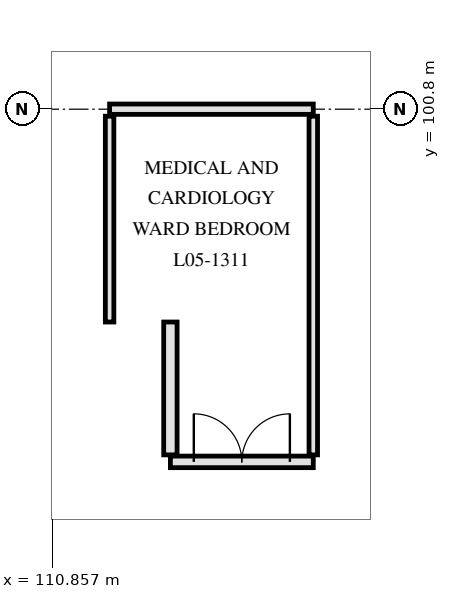
"""IFC4 building model, lengths in metres.
Left out: names, types, materials, properties, quantities, classifications, styles, units other than length and angle.
Written with IfcOpenShell. Run it as: python <this file> out.ifc"""

import sys

from ifc_helpers import new_model, si_unit, direction, frame, frame_2d, origin, place, context, subcontext, project, spatial, rectangle, extrude, element, fill, save


model = new_model("IFC4")
c1 = context("Model", 3, precision=1e-05, world=origin(), true_north=direction((0.0, 1.0)))
c2 = subcontext(c1, "Body", "Model", "MODEL_VIEW")
j1 = project(units=[si_unit("LENGTHUNIT", "METRE"), si_unit("PLANEANGLEUNIT", "RADIAN")], contexts=[c1])
p1 = place(None, origin())
s1 = spatial("IfcSite", under=j1, at=p1, CompositionType="ELEMENT")
p2 = place(p1, origin())
s2 = spatial("IfcBuilding", under=s1, at=p2, CompositionType="ELEMENT")
p3 = place(p2, frame((0.0, 0.0, 22.5)))
s3 = spatial("IfcBuildingStorey", under=s2, at=p3, CompositionType="ELEMENT", Elevation=22.5)
p4 = place(p3, frame((112.8, 95.0, 0.0), z_axis=(0.0, 0.0, 1.0), x_axis=(1.0, 0.0, 0.0)))
e1 = element("IfcWall", 1, at=p4, inside=s3, PredefinedType="PARTITIONING", context=c2, shape_type="SweptSolid", body=[
    extrude(rectangle(XDim=2.35, YDim=0.19, at=frame_2d((1.175, 0.0))), origin(), (0.0, 0.0, 1.0), 3.61),
])
p5 = place(p4, frame((0.385, 0.0, 0.0)))
e2 = element("IfcOpeningElement", 2, at=p5, cuts=e1, PredefinedType="OPENING", context=c2, shape_type="SweptSolid", body=[
    extrude(rectangle(XDim=1.58, YDim=2.22, at=frame_2d((0.79, 1.11))), frame((0.0, 0.105, 0.0), z_axis=(0.0, -1.0, 0.0), x_axis=(1.0, 0.0, 0.0)), (0.0, 0.0, 1.0), 0.21),
])
p6 = place(p3, frame((111.8, 100.8, 0.0), z_axis=(0.0, 0.0, 1.0), x_axis=(1.0, 0.0, 0.0)))
e3 = element("IfcWall", 3, at=p6, inside=s3, PredefinedType="PARTITIONING", context=c2, shape_type="SweptSolid", body=[
    extrude(rectangle(XDim=3.35, YDim=0.17, at=frame_2d((1.675, 0.0))), origin(), (0.0, 0.0, 1.0), 3.16),
])
p7 = place(p3, frame((111.8, 97.3, 0.0), z_axis=(0.0, 0.0, 1.0), x_axis=(0.0, 1.0, 0.0)))
e4 = element("IfcWall", 4, at=p7, inside=s3, PredefinedType="PARTITIONING", context=c2, shape_type="SweptSolid", body=[
    extrude(rectangle(XDim=3.385, YDim=0.14, at=frame_2d((1.692, 0.0))), origin(), (0.0, 0.0, 1.0), 3.34),
])
p8 = place(p3, frame((112.8, 95.115, 0.0), z_axis=(0.0, 0.0, 1.0), x_axis=(0.0, 1.0, 0.0)))
e5 = element("IfcWall", 5, at=p8, inside=s3, PredefinedType="PARTITIONING", context=c2, shape_type="SweptSolid", body=[
    extrude(rectangle(XDim=2.185, YDim=0.22, at=frame_2d((1.093, 0.0))), origin(), (0.0, 0.0, 1.0), 3.34),
])
p9 = place(p3, frame((115.15, 95.115, 0.0), z_axis=(0.0, 0.0, 1.0), x_axis=(0.0, 1.0, 0.0)))
e6 = element("IfcWall", 6, at=p9, inside=s3, PredefinedType="PARTITIONING", context=c2, shape_type="SweptSolid", body=[
    extrude(rectangle(XDim=5.57, YDim=0.14, at=frame_2d((2.785, 0.0))), origin(), (0.0, 0.0, 1.0), 3.34),
])
p10 = place(p5, origin())
e7 = element("IfcDoor", 7, at=p10, inside=s3, OperationType="DOUBLE_SWING_LEFT", PredefinedType="DOOR", context=c2, shape_type="SweptSolid", body=[
    extrude(rectangle(XDim=1.58, YDim=2.22, at=frame_2d((0.79, 1.11))), frame((0.0, 0.025, 0.0), z_axis=(0.0, -1.0, 0.0), x_axis=(1.0, 0.0, 0.0)), (0.0, 0.0, 1.0), 0.05),
])
fill(e2, e7)
save(model, sys.argv[1])
